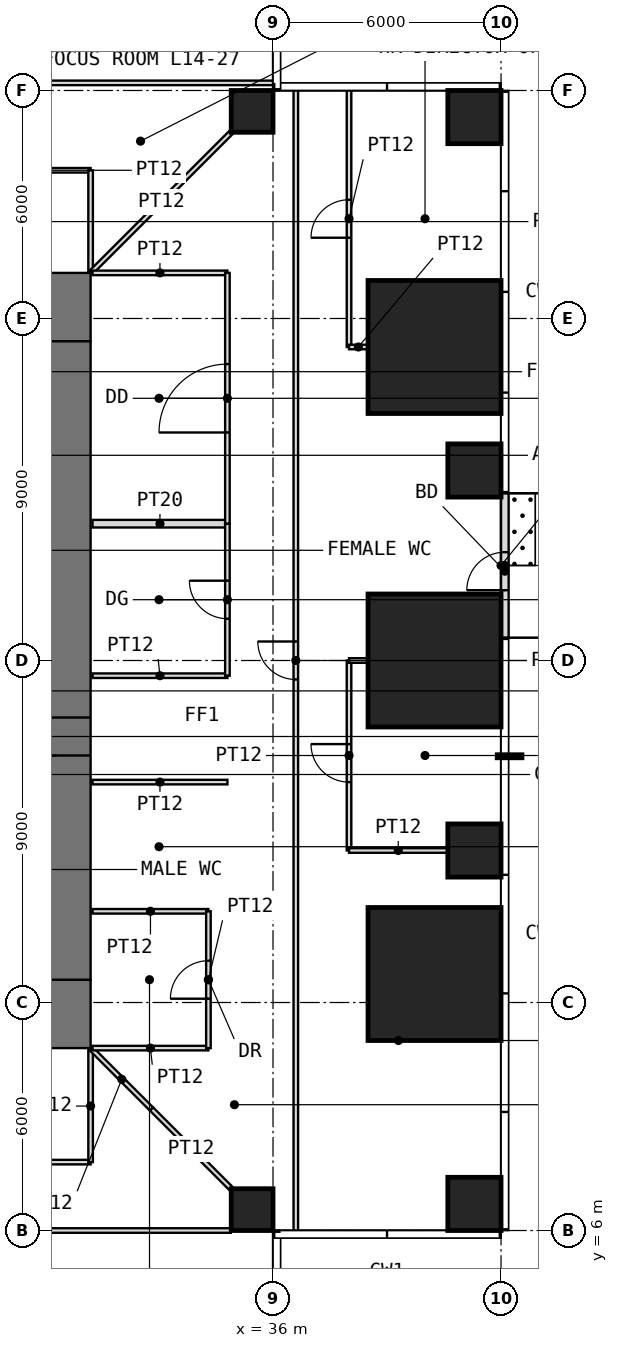
"""IFC4 building model, lengths in metres.
Left out: names, types, materials, properties, quantities, classifications, styles, units other than length and angle.
Written with IfcOpenShell. Run it as: python <this file> out.ifc"""

import sys

from ifc_helpers import new_model, si_unit, direction, frame, frame_2d, origin, origin_2d, place, context, subcontext, project, spatial, rectangle, extrude, element, fill, save


model = new_model("IFC4")
c1 = context("Model", 3, precision=1e-05, world=origin(), true_north=direction((0.0, 1.0)))
c2 = subcontext(c1, "Body", "Model", "MODEL_VIEW")
j1 = project(units=[si_unit("LENGTHUNIT", "METRE"), si_unit("PLANEANGLEUNIT", "RADIAN")], contexts=[c1])
p1 = place(None, origin())
s1 = spatial("IfcSite", under=j1, at=p1, CompositionType="ELEMENT")
p2 = place(p1, origin())
s2 = spatial("IfcBuilding", under=s1, at=p2, CompositionType="ELEMENT")
p3 = place(p2, frame((0.0, 0.0, 62.5)))
s3 = spatial("IfcBuildingStorey", under=s2, at=p3, CompositionType="ELEMENT", Elevation=62.5)
p4 = place(p3, frame((35.45, 6.55, 0.0), z_axis=(0.0, 0.0, 1.0), x_axis=(1.0, 0.0, 0.0)))
e1 = element("IfcColumn", 1, at=p4, inside=s3, PredefinedType="COLUMN", context=c2, shape_type="SweptSolid", body=[
    extrude(rectangle(XDim=1.1, YDim=1.1, at=origin_2d()), origin(), (0.0, 0.0, 1.0), 4.0),
])
p5 = place(p3, frame((41.3, 6.7, 0.0), z_axis=(0.0, 0.0, 1.0), x_axis=(1.0, 0.0, 0.0)))
e2 = element("IfcColumn", 2, at=p5, inside=s3, PredefinedType="COLUMN", context=c2, shape_type="SweptSolid", body=[
    extrude(rectangle(XDim=1.4, YDim=1.4, at=origin_2d()), origin(), (0.0, 0.0, 1.0), 4.0),
])
p6 = place(p3, frame((40.25, 12.75, 0.0), z_axis=(0.0, 0.0, 1.0), x_axis=(1.0, 0.0, 0.0)))
e3 = element("IfcColumn", 3, at=p6, inside=s3, PredefinedType="COLUMN", context=c2, shape_type="SweptSolid", body=[
    extrude(rectangle(XDim=3.5, YDim=3.5, at=origin_2d()), origin(), (0.0, 0.0, 1.0), 4.0),
])
p7 = place(p3, frame((41.3, 16.0, 0.0), z_axis=(0.0, 0.0, 1.0), x_axis=(1.0, 0.0, 0.0)))
e4 = element("IfcColumn", 4, at=p7, inside=s3, PredefinedType="COLUMN", context=c2, shape_type="SweptSolid", body=[
    extrude(rectangle(XDim=1.4, YDim=1.4, at=origin_2d()), origin(), (0.0, 0.0, 1.0), 4.0),
])
p8 = place(p3, frame((40.25, 21.0, 0.0), z_axis=(0.0, 0.0, 1.0), x_axis=(1.0, 0.0, 0.0)))
e5 = element("IfcColumn", 5, at=p8, inside=s3, PredefinedType="COLUMN", context=c2, shape_type="SweptSolid", body=[
    extrude(rectangle(XDim=3.5, YDim=3.5, at=origin_2d()), origin(), (0.0, 0.0, 1.0), 4.0),
])
p9 = place(p3, frame((41.3, 26.0, 0.0), z_axis=(0.0, 0.0, 1.0), x_axis=(1.0, 0.0, 0.0)))
e6 = element("IfcColumn", 6, at=p9, inside=s3, PredefinedType="COLUMN", context=c2, shape_type="SweptSolid", body=[
    extrude(rectangle(XDim=1.4, YDim=1.4, at=origin_2d()), origin(), (0.0, 0.0, 1.0), 4.0),
])
p10 = place(p3, frame((40.25, 29.25, 0.0), z_axis=(0.0, 0.0, 1.0), x_axis=(1.0, 0.0, 0.0)))
e7 = element("IfcColumn", 7, at=p10, inside=s3, PredefinedType="COLUMN", context=c2, shape_type="SweptSolid", body=[
    extrude(rectangle(XDim=3.5, YDim=3.5, at=origin_2d()), origin(), (0.0, 0.0, 1.0), 4.0),
])
p11 = place(p3, frame((35.45, 35.45, 0.0), z_axis=(0.0, 0.0, 1.0), x_axis=(1.0, 0.0, 0.0)))
e8 = element("IfcColumn", 8, at=p11, inside=s3, PredefinedType="COLUMN", context=c2, shape_type="SweptSolid", body=[
    extrude(rectangle(XDim=1.1, YDim=1.1, at=origin_2d()), origin(), (0.0, 0.0, 1.0), 4.0),
])
p12 = place(p3, frame((41.3, 35.3, 0.0), z_axis=(0.0, 0.0, 1.0), x_axis=(1.0, 0.0, 0.0)))
e9 = element("IfcColumn", 9, at=p12, inside=s3, PredefinedType="COLUMN", context=c2, shape_type="SweptSolid", body=[
    extrude(rectangle(XDim=1.4, YDim=1.4, at=origin_2d()), origin(), (0.0, 0.0, 1.0), 4.0),
])
p13 = place(p3, frame((42.1, 21.6, 0.0), z_axis=(0.0, 0.0, 1.0), x_axis=(0.0, 1.0, 0.0)))
e10 = element("IfcWall", 10, at=p13, inside=s3, PredefinedType="USERDEFINED", context=c2, shape_type="SweptSolid", body=[
    extrude(rectangle(XDim=3.8, YDim=0.2, at=frame_2d((1.9, 0.0))), origin(), (0.0, 0.0, 1.0), 3.75),
])
p14 = place(p13, frame((1.25, 0.0, 0.0)))
e11 = element("IfcOpeningElement", 11, at=p14, cuts=e10, PredefinedType="OPENING", context=c2, shape_type="SweptSolid", body=[
    extrude(rectangle(XDim=1.0, YDim=2.4, at=frame_2d((0.5, 1.2))), frame((0.0, 0.11, 0.0), z_axis=(0.0, -1.0, 0.0), x_axis=(1.0, 0.0, 0.0)), (0.0, 0.0, 1.0), 0.22),
])
p15 = place(p3, frame((10.8, 11.7, -0.05), z_axis=(0.0, 0.0, 1.0), x_axis=(1.0, 0.0, 0.0)))
e12 = element("IfcWall", 12, at=p15, inside=s3, PredefinedType="SHEAR", context=c2, shape_type="SweptSolid", body=[
    extrude(rectangle(XDim=20.4, YDim=1.8, at=frame_2d((10.2, 0.0))), origin(), (0.0, 0.0, 1.0), 4.0),
])
p16 = place(p15, frame((9.2, 0.0, 0.05)))
e13 = element("IfcOpeningElement", 13, at=p16, cuts=e12, PredefinedType="OPENING", context=c2, shape_type="SweptSolid", body=[
    extrude(rectangle(XDim=2.0, YDim=2.2, at=frame_2d((1.0, 1.1))), frame((0.0, 0.91, 0.0), z_axis=(0.0, -1.0, 0.0), x_axis=(1.0, 0.0, 0.0)), (0.0, 0.0, 1.0), 1.82),
])
p17 = place(p3, frame((10.8, 30.3, -0.05), z_axis=(0.0, 0.0, 1.0), x_axis=(1.0, 0.0, 0.0)))
e14 = element("IfcWall", 14, at=p17, inside=s3, PredefinedType="SHEAR", context=c2, shape_type="SweptSolid", body=[
    extrude(rectangle(XDim=20.4, YDim=1.8, at=frame_2d((10.2, 0.0))), origin(), (0.0, 0.0, 1.0), 4.0),
])
p18 = place(p17, frame((9.2, 0.0, 0.05)))
e15 = element("IfcOpeningElement", 15, at=p18, cuts=e14, PredefinedType="OPENING", context=c2, shape_type="SweptSolid", body=[
    extrude(rectangle(XDim=2.0, YDim=2.2, at=frame_2d((1.0, 1.1))), frame((0.0, 0.91, 0.0), z_axis=(0.0, -1.0, 0.0), x_axis=(1.0, 0.0, 0.0)), (0.0, 0.0, 1.0), 1.82),
])
p19 = place(p3, frame((30.3, 12.6, -0.05), z_axis=(0.0, 0.0, 1.0), x_axis=(0.0, 1.0, 0.0)))
e16 = element("IfcWall", 16, at=p19, inside=s3, PredefinedType="SHEAR", context=c2, shape_type="SweptSolid", body=[
    extrude(rectangle(XDim=16.8, YDim=1.8, at=frame_2d((8.4, 0.0))), origin(), (0.0, 0.0, 1.0), 4.0),
])
p20 = place(p19, frame((5.9, 0.0, 0.05)))
e17 = element("IfcOpeningElement", 17, at=p20, cuts=e16, PredefinedType="OPENING", context=c2, shape_type="SweptSolid", body=[
    extrude(rectangle(XDim=1.0, YDim=2.2, at=frame_2d((0.5, 1.1))), frame((0.0, 0.91, 0.0), z_axis=(0.0, -1.0, 0.0), x_axis=(1.0, 0.0, 0.0)), (0.0, 0.0, 1.0), 1.82),
])
p21 = place(p3, frame((6.0, 36.2, 0.0), z_axis=(0.0, 0.0, 1.0), x_axis=(1.0, 0.0, 0.0)))
e18 = element("IfcWall", 18, at=p21, inside=s3, PredefinedType="PARTITIONING", context=c2, shape_type="SweptSolid", body=[
    extrude(rectangle(XDim=30.0, YDim=0.12, at=frame_2d((15.0, 0.0))), origin(), (0.0, 0.0, 1.0), 3.75),
])
p22 = place(p21, frame((14.5, 0.0, 0.0)))
e19 = element("IfcOpeningElement", 19, at=p22, cuts=e18, PredefinedType="OPENING", context=c2, shape_type="SweptSolid", body=[
    extrude(rectangle(XDim=1.0, YDim=2.4, at=frame_2d((0.5, 1.2))), frame((0.0, 0.07, 0.0), z_axis=(0.0, -1.0, 0.0), x_axis=(1.0, 0.0, 0.0)), (0.0, 0.0, 1.0), 0.14),
])
p23 = place(p3, frame((7.11, 6.0, 0.0), z_axis=(0.0, 0.0, 1.0), x_axis=(1.0, 0.0, 0.0)))
e20 = element("IfcWall", 20, at=p23, inside=s3, PredefinedType="PARTITIONING", context=c2, shape_type="SweptSolid", body=[
    extrude(rectangle(XDim=27.78, YDim=0.12, at=frame_2d((13.89, 0.0))), origin(), (0.0, 0.0, 1.0), 3.75),
])
p24 = place(p23, frame((13.39, 0.0, 0.0)))
e21 = element("IfcOpeningElement", 21, at=p24, cuts=e20, PredefinedType="OPENING", context=c2, shape_type="SweptSolid", body=[
    extrude(rectangle(XDim=1.0, YDim=2.4, at=frame_2d((0.5, 1.2))), frame((0.0, 0.07, 0.0), z_axis=(0.0, -1.0, 0.0), x_axis=(1.0, 0.0, 0.0)), (0.0, 0.0, 1.0), 0.14),
])
p25 = place(p3, frame((23.2, 7.8, 0.0), z_axis=(0.0, 0.0, 1.0), x_axis=(1.0, 0.0, 0.0)))
e22 = element("IfcWall", 22, at=p25, inside=s3, PredefinedType="PARTITIONING", context=c2, shape_type="SweptSolid", body=[
    extrude(rectangle(XDim=8.0, YDim=0.12, at=frame_2d((4.0, 0.0))), origin(), (0.0, 0.0, 1.0), 3.75),
])
p26 = place(p25, frame((3.1, 0.0, 0.0)))
e23 = element("IfcOpeningElement", 23, at=p26, cuts=e22, PredefinedType="OPENING", context=c2, shape_type="SweptSolid", body=[
    extrude(rectangle(XDim=1.8, YDim=2.4, at=frame_2d((0.9, 1.2))), frame((0.0, 0.07, 0.0), z_axis=(0.0, -1.0, 0.0), x_axis=(1.0, 0.0, 0.0)), (0.0, 0.0, 1.0), 0.14),
])
p27 = place(p3, frame((27.2, 33.9, 0.0), z_axis=(0.0, 0.0, 1.0), x_axis=(1.0, 0.0, 0.0)))
e24 = element("IfcWall", 24, at=p27, inside=s3, PredefinedType="PARTITIONING", context=c2, shape_type="SweptSolid", body=[
    extrude(rectangle(XDim=4.0, YDim=0.12, at=frame_2d((2.0, 0.0))), origin(), (0.0, 0.0, 1.0), 3.75),
])
p28 = place(p27, frame((1.5, 0.0, 0.0)))
e25 = element("IfcOpeningElement", 25, at=p28, cuts=e24, PredefinedType="OPENING", context=c2, shape_type="SweptSolid", body=[
    extrude(rectangle(XDim=1.0, YDim=2.2, at=frame_2d((0.5, 1.1))), frame((0.0, 0.07, 0.0), z_axis=(0.0, -1.0, 0.0), x_axis=(1.0, 0.0, 0.0)), (0.0, 0.0, 1.0), 0.14),
])
p29 = place(p3, frame((31.2, 7.8, 0.0), z_axis=(0.0, 0.0, 1.0), x_axis=(0.0, 1.0, 0.0)))
e26 = element("IfcWall", 26, at=p29, inside=s3, PredefinedType="PARTITIONING", context=c2, shape_type="SweptSolid", body=[
    extrude(rectangle(XDim=2.95, YDim=0.12, at=frame_2d((1.475, 0.0))), origin(), (0.0, 0.0, 1.0), 3.75),
])
p30 = place(p3, frame((31.2, 31.25, 0.0), z_axis=(0.0, 0.0, 1.0), x_axis=(0.0, 1.0, 0.0)))
e27 = element("IfcWall", 27, at=p30, inside=s3, PredefinedType="PARTITIONING", context=c2, shape_type="SweptSolid", body=[
    extrude(rectangle(XDim=2.65, YDim=0.12, at=frame_2d((1.325, 0.0))), origin(), (0.0, 0.0, 1.0), 3.75),
])
p31 = place(p3, frame((31.235, 10.765, 0.0), z_axis=(0.0, 0.0, 1.0), x_axis=(0.707106781187, -0.707106781187, 0.0)))
e28 = element("IfcWall", 28, at=p31, inside=s3, PredefinedType="PARTITIONING", context=c2, shape_type="SweptSolid", body=[
    extrude(rectangle(XDim=2.218, YDim=0.12, at=frame_2d((1.109, 0.0))), origin(), (0.0, 0.0, 1.0), 3.75),
])
p32 = place(p3, frame((31.235, 31.235, 0.0), z_axis=(0.0, 0.0, 1.0), x_axis=(0.707106781187, 0.707106781187, 0.0)))
e29 = element("IfcWall", 29, at=p32, inside=s3, PredefinedType="PARTITIONING", context=c2, shape_type="SweptSolid", body=[
    extrude(rectangle(XDim=5.168, YDim=0.12, at=frame_2d((2.584, 0.0))), origin(), (0.0, 0.0, 1.0), 3.75),
])
for number, where, z_axis, x_axis in (
    (30, (31.25, 10.8, 0.0), (0.0, 0.0, 1.0), (1.0, 0.0, 0.0)),
    (31, (31.25, 14.4, 0.0), (0.0, 0.0, 1.0), (1.0, 0.0, 0.0)),
):
    element("IfcWall", number, at=place(p3, frame(where, z_axis=z_axis, x_axis=x_axis)), inside=s3, PredefinedType="PARTITIONING", context=c2, shape_type="SweptSolid", body=[
        extrude(rectangle(XDim=3.05, YDim=0.12, at=frame_2d((1.525, 0.0))), origin(), (0.0, 0.0, 1.0), 3.75),
    ])
for number, where, z_axis, x_axis in (
    (32, (31.25, 17.8, 0.0), (0.0, 0.0, 1.0), (1.0, 0.0, 0.0)),
    (33, (31.25, 20.6, 0.0), (0.0, 0.0, 1.0), (1.0, 0.0, 0.0)),
):
    element("IfcWall", number, at=place(p3, frame(where, z_axis=z_axis, x_axis=x_axis)), inside=s3, PredefinedType="PARTITIONING", context=c2, shape_type="SweptSolid", body=[
        extrude(rectangle(XDim=3.55, YDim=0.12, at=frame_2d((1.775, 0.0))), origin(), (0.0, 0.0, 1.0), 3.75),
    ])
p33 = place(p3, frame((31.25, 24.6, 0.0), z_axis=(0.0, 0.0, 1.0), x_axis=(1.0, 0.0, 0.0)))
e34 = element("IfcWall", 34, at=p33, inside=s3, PredefinedType="PARTITIONING", context=c2, shape_type="SweptSolid", body=[
    extrude(rectangle(XDim=3.55, YDim=0.2, at=frame_2d((1.775, 0.0))), origin(), (0.0, 0.0, 1.0), 3.75),
])
p34 = place(p3, frame((31.25, 31.2, 0.0), z_axis=(0.0, 0.0, 1.0), x_axis=(1.0, 0.0, 0.0)))
e35 = element("IfcWall", 35, at=p34, inside=s3, PredefinedType="PARTITIONING", context=c2, shape_type="SweptSolid", body=[
    extrude(rectangle(XDim=3.55, YDim=0.12, at=frame_2d((1.775, 0.0))), origin(), (0.0, 0.0, 1.0), 3.75),
])
p35 = place(p3, frame((32.804, 9.196, 0.0), z_axis=(0.0, 0.0, 1.0), x_axis=(0.707106781187, -0.707106781187, 0.0)))
e36 = element("IfcWall", 36, at=p35, inside=s3, PredefinedType="PARTITIONING", context=c2, shape_type="SweptSolid", body=[
    extrude(rectangle(XDim=2.95, YDim=0.12, at=frame_2d((1.475, 0.0))), origin(), (0.0, 0.0, 1.0), 3.75),
])
p36 = place(p3, frame((34.3, 10.8, 0.0), z_axis=(0.0, 0.0, 1.0), x_axis=(0.0, 1.0, 0.0)))
e37 = element("IfcWall", 37, at=p36, inside=s3, PredefinedType="PARTITIONING", context=c2, shape_type="SweptSolid", body=[
    extrude(rectangle(XDim=3.6, YDim=0.12, at=frame_2d((1.8, 0.0))), origin(), (0.0, 0.0, 1.0), 3.75),
])
p37 = place(p36, frame((1.3, 0.0, 0.0)))
e38 = element("IfcOpeningElement", 38, at=p37, cuts=e37, PredefinedType="OPENING", context=c2, shape_type="SweptSolid", body=[
    extrude(rectangle(XDim=1.0, YDim=2.2, at=frame_2d((0.5, 1.1))), frame((0.0, 0.07, 0.0), z_axis=(0.0, -1.0, 0.0), x_axis=(1.0, 0.0, 0.0)), (0.0, 0.0, 1.0), 0.14),
])
p38 = place(p3, frame((34.8, 20.6, 0.0), z_axis=(0.0, 0.0, 1.0), x_axis=(0.0, 1.0, 0.0)))
e39 = element("IfcWall", 39, at=p38, inside=s3, PredefinedType="PARTITIONING", context=c2, shape_type="SweptSolid", body=[
    extrude(rectangle(XDim=4.0, YDim=0.12, at=frame_2d((2.0, 0.0))), origin(), (0.0, 0.0, 1.0), 3.75),
])
p39 = place(p38, frame((1.5, 0.0, 0.0)))
e40 = element("IfcOpeningElement", 40, at=p39, cuts=e39, PredefinedType="OPENING", context=c2, shape_type="SweptSolid", body=[
    extrude(rectangle(XDim=1.0, YDim=2.4, at=frame_2d((0.5, 1.2))), frame((0.0, 0.07, 0.0), z_axis=(0.0, -1.0, 0.0), x_axis=(1.0, 0.0, 0.0)), (0.0, 0.0, 1.0), 0.14),
])
p40 = place(p3, frame((34.8, 24.6, 0.0), z_axis=(0.0, 0.0, 1.0), x_axis=(0.0, 1.0, 0.0)))
e41 = element("IfcWall", 41, at=p40, inside=s3, PredefinedType="PARTITIONING", context=c2, shape_type="SweptSolid", body=[
    extrude(rectangle(XDim=6.6, YDim=0.12, at=frame_2d((3.3, 0.0))), origin(), (0.0, 0.0, 1.0), 3.75),
])
p41 = place(p40, frame((2.4, 0.0, 0.0)))
e42 = element("IfcOpeningElement", 42, at=p41, cuts=e41, PredefinedType="OPENING", context=c2, shape_type="SweptSolid", body=[
    extrude(rectangle(XDim=1.8, YDim=2.4, at=frame_2d((0.9, 1.2))), frame((0.0, 0.07, 0.0), z_axis=(0.0, -1.0, 0.0), x_axis=(1.0, 0.0, 0.0)), (0.0, 0.0, 1.0), 0.14),
])
p42 = place(p3, frame((36.6, 6.0, 0.0), z_axis=(0.0, 0.0, 1.0), x_axis=(0.0, 1.0, 0.0)))
e43 = element("IfcWall", 43, at=p42, inside=s3, PredefinedType="PARTITIONING", context=c2, shape_type="SweptSolid", body=[
    extrude(rectangle(XDim=30.0, YDim=0.12, at=frame_2d((15.0, 0.0))), origin(), (0.0, 0.0, 1.0), 3.75),
])
p43 = place(p42, frame((14.5, 0.0, 0.0)))
e44 = element("IfcOpeningElement", 44, at=p43, cuts=e43, PredefinedType="OPENING", context=c2, shape_type="SweptSolid", body=[
    extrude(rectangle(XDim=1.0, YDim=2.4, at=frame_2d((0.5, 1.2))), frame((0.0, 0.07, 0.0), z_axis=(0.0, -1.0, 0.0), x_axis=(1.0, 0.0, 0.0)), (0.0, 0.0, 1.0), 0.14),
])
p44 = place(p3, frame((38.0, 16.0, 0.0), z_axis=(0.0, 0.0, 1.0), x_axis=(0.0, 1.0, 0.0)))
e45 = element("IfcWall", 45, at=p44, inside=s3, PredefinedType="PARTITIONING", context=c2, shape_type="SweptSolid", body=[
    extrude(rectangle(XDim=5.0, YDim=0.12, at=frame_2d((2.5, 0.0))), origin(), (0.0, 0.0, 1.0), 3.75),
])
p45 = place(p44, frame((1.8, 0.0, 0.0)))
e46 = element("IfcOpeningElement", 46, at=p45, cuts=e45, PredefinedType="OPENING", context=c2, shape_type="SweptSolid", body=[
    extrude(rectangle(XDim=1.0, YDim=2.2, at=frame_2d((0.5, 1.1))), frame((0.0, 0.07, 0.0), z_axis=(0.0, -1.0, 0.0), x_axis=(1.0, 0.0, 0.0)), (0.0, 0.0, 1.0), 0.14),
])
p46 = place(p3, frame((38.0, 16.0, 0.0), z_axis=(0.0, 0.0, 1.0), x_axis=(1.0, 0.0, 0.0)))
e47 = element("IfcWall", 47, at=p46, inside=s3, PredefinedType="PARTITIONING", context=c2, shape_type="SweptSolid", body=[
    extrude(rectangle(XDim=2.59, YDim=0.12, at=frame_2d((1.295, 0.0))), origin(), (0.0, 0.0, 1.0), 3.75),
])
p47 = place(p3, frame((38.0, 21.0, 0.0), z_axis=(0.0, 0.0, 1.0), x_axis=(1.0, 0.0, 0.0)))
e48 = element("IfcWall", 48, at=p47, inside=s3, PredefinedType="PARTITIONING", context=c2, shape_type="SweptSolid", body=[
    extrude(rectangle(XDim=0.49, YDim=0.12, at=frame_2d((0.245, 0.0))), origin(), (0.0, 0.0, 1.0), 3.75),
])
p48 = place(p3, frame((38.0, 29.25, 0.0), z_axis=(0.0, 0.0, 1.0), x_axis=(0.0, 1.0, 0.0)))
e49 = element("IfcWall", 49, at=p48, inside=s3, PredefinedType="PARTITIONING", context=c2, shape_type="SweptSolid", body=[
    extrude(rectangle(XDim=6.75, YDim=0.12, at=frame_2d((3.375, 0.0))), origin(), (0.0, 0.0, 1.0), 3.75),
])
p49 = place(p48, frame((2.875, 0.0, 0.0)))
e50 = element("IfcOpeningElement", 50, at=p49, cuts=e49, PredefinedType="OPENING", context=c2, shape_type="SweptSolid", body=[
    extrude(rectangle(XDim=1.0, YDim=2.2, at=frame_2d((0.5, 1.1))), frame((0.0, 0.07, 0.0), z_axis=(0.0, -1.0, 0.0), x_axis=(1.0, 0.0, 0.0)), (0.0, 0.0, 1.0), 0.14),
])
p50 = place(p3, frame((38.0, 29.25, 0.0), z_axis=(0.0, 0.0, 1.0), x_axis=(1.0, 0.0, 0.0)))
e51 = element("IfcWall", 51, at=p50, inside=s3, PredefinedType="PARTITIONING", context=c2, shape_type="SweptSolid", body=[
    extrude(rectangle(XDim=0.49, YDim=0.12, at=frame_2d((0.245, 0.0))), origin(), (0.0, 0.0, 1.0), 3.75),
])
p51 = place(p14, origin())
e52 = element("IfcDoor", 52, at=p51, inside=s3, OperationType="SINGLE_SWING_LEFT", PredefinedType="DOOR", context=c2, shape_type="SweptSolid", body=[
    extrude(rectangle(XDim=1.0, YDim=2.4, at=frame_2d((0.5, 1.2))), frame((0.0, 0.025, 0.0), z_axis=(0.0, -1.0, 0.0), x_axis=(1.0, 0.0, 0.0)), (0.0, 0.0, 1.0), 0.05),
])
fill(e11, e52)
p52 = place(p20, origin())
e53 = element("IfcDoor", 53, at=p52, inside=s3, OperationType="SINGLE_SWING_LEFT", PredefinedType="DOOR", context=c2, shape_type="SweptSolid", body=[
    extrude(rectangle(XDim=1.0, YDim=2.2, at=frame_2d((0.5, 1.1))), frame((0.0, 0.025, 0.0), z_axis=(0.0, -1.0, 0.0), x_axis=(1.0, 0.0, 0.0)), (0.0, 0.0, 1.0), 0.05),
])
fill(e17, e53)
p53 = place(p37, origin())
e54 = element("IfcDoor", 54, at=p53, inside=s3, OperationType="SINGLE_SWING_LEFT", PredefinedType="DOOR", context=c2, shape_type="SweptSolid", body=[
    extrude(rectangle(XDim=1.0, YDim=2.2, at=frame_2d((0.5, 1.1))), frame((0.0, 0.025, 0.0), z_axis=(0.0, -1.0, 0.0), x_axis=(1.0, 0.0, 0.0)), (0.0, 0.0, 1.0), 0.05),
])
fill(e38, e54)
p54 = place(p39, origin())
e55 = element("IfcDoor", 55, at=p54, inside=s3, OperationType="SINGLE_SWING_RIGHT", PredefinedType="DOOR", context=c2, shape_type="SweptSolid", body=[
    extrude(rectangle(XDim=1.0, YDim=2.4, at=frame_2d((0.5, 1.2))), frame((0.0, 0.025, 0.0), z_axis=(0.0, -1.0, 0.0), x_axis=(1.0, 0.0, 0.0)), (0.0, 0.0, 1.0), 0.05),
])
fill(e40, e55)
p55 = place(p41, origin())
e56 = element("IfcDoor", 56, at=p55, inside=s3, OperationType="DOUBLE_DOOR_SINGLE_SWING", PredefinedType="DOOR", context=c2, shape_type="SweptSolid", body=[
    extrude(rectangle(XDim=1.8, YDim=2.4, at=frame_2d((0.9, 1.2))), frame((0.0, 0.025, 0.0), z_axis=(0.0, -1.0, 0.0), x_axis=(1.0, 0.0, 0.0)), (0.0, 0.0, 1.0), 0.05),
])
fill(e42, e56)
p56 = place(p45, origin())
e57 = element("IfcDoor", 57, at=p56, inside=s3, OperationType="SINGLE_SWING_RIGHT", PredefinedType="DOOR", context=c2, shape_type="SweptSolid", body=[
    extrude(rectangle(XDim=1.0, YDim=2.2, at=frame_2d((0.5, 1.1))), frame((0.0, 0.025, 0.0), z_axis=(0.0, -1.0, 0.0), x_axis=(1.0, 0.0, 0.0)), (0.0, 0.0, 1.0), 0.05),
])
fill(e46, e57)
p57 = place(p49, origin())
e58 = element("IfcDoor", 58, at=p57, inside=s3, OperationType="SINGLE_SWING_LEFT", PredefinedType="DOOR", context=c2, shape_type="SweptSolid", body=[
    extrude(rectangle(XDim=1.0, YDim=2.2, at=frame_2d((0.5, 1.1))), frame((0.0, 0.025, 0.0), z_axis=(0.0, -1.0, 0.0), x_axis=(1.0, 0.0, 0.0)), (0.0, 0.0, 1.0), 0.05),
])
fill(e50, e58)
p58 = place(p43, origin())
e59 = element("IfcDoor", 59, at=p58, inside=s3, OperationType="SINGLE_SWING_RIGHT", PredefinedType="DOOR", context=c2, shape_type="SweptSolid", body=[
    extrude(rectangle(XDim=1.0, YDim=2.4, at=frame_2d((0.5, 1.2))), frame((0.0, 0.025, 0.0), z_axis=(0.0, -1.0, 0.0), x_axis=(1.0, 0.0, 0.0)), (0.0, 0.0, 1.0), 0.05),
])
fill(e44, e59)
save(model, sys.argv[1])
